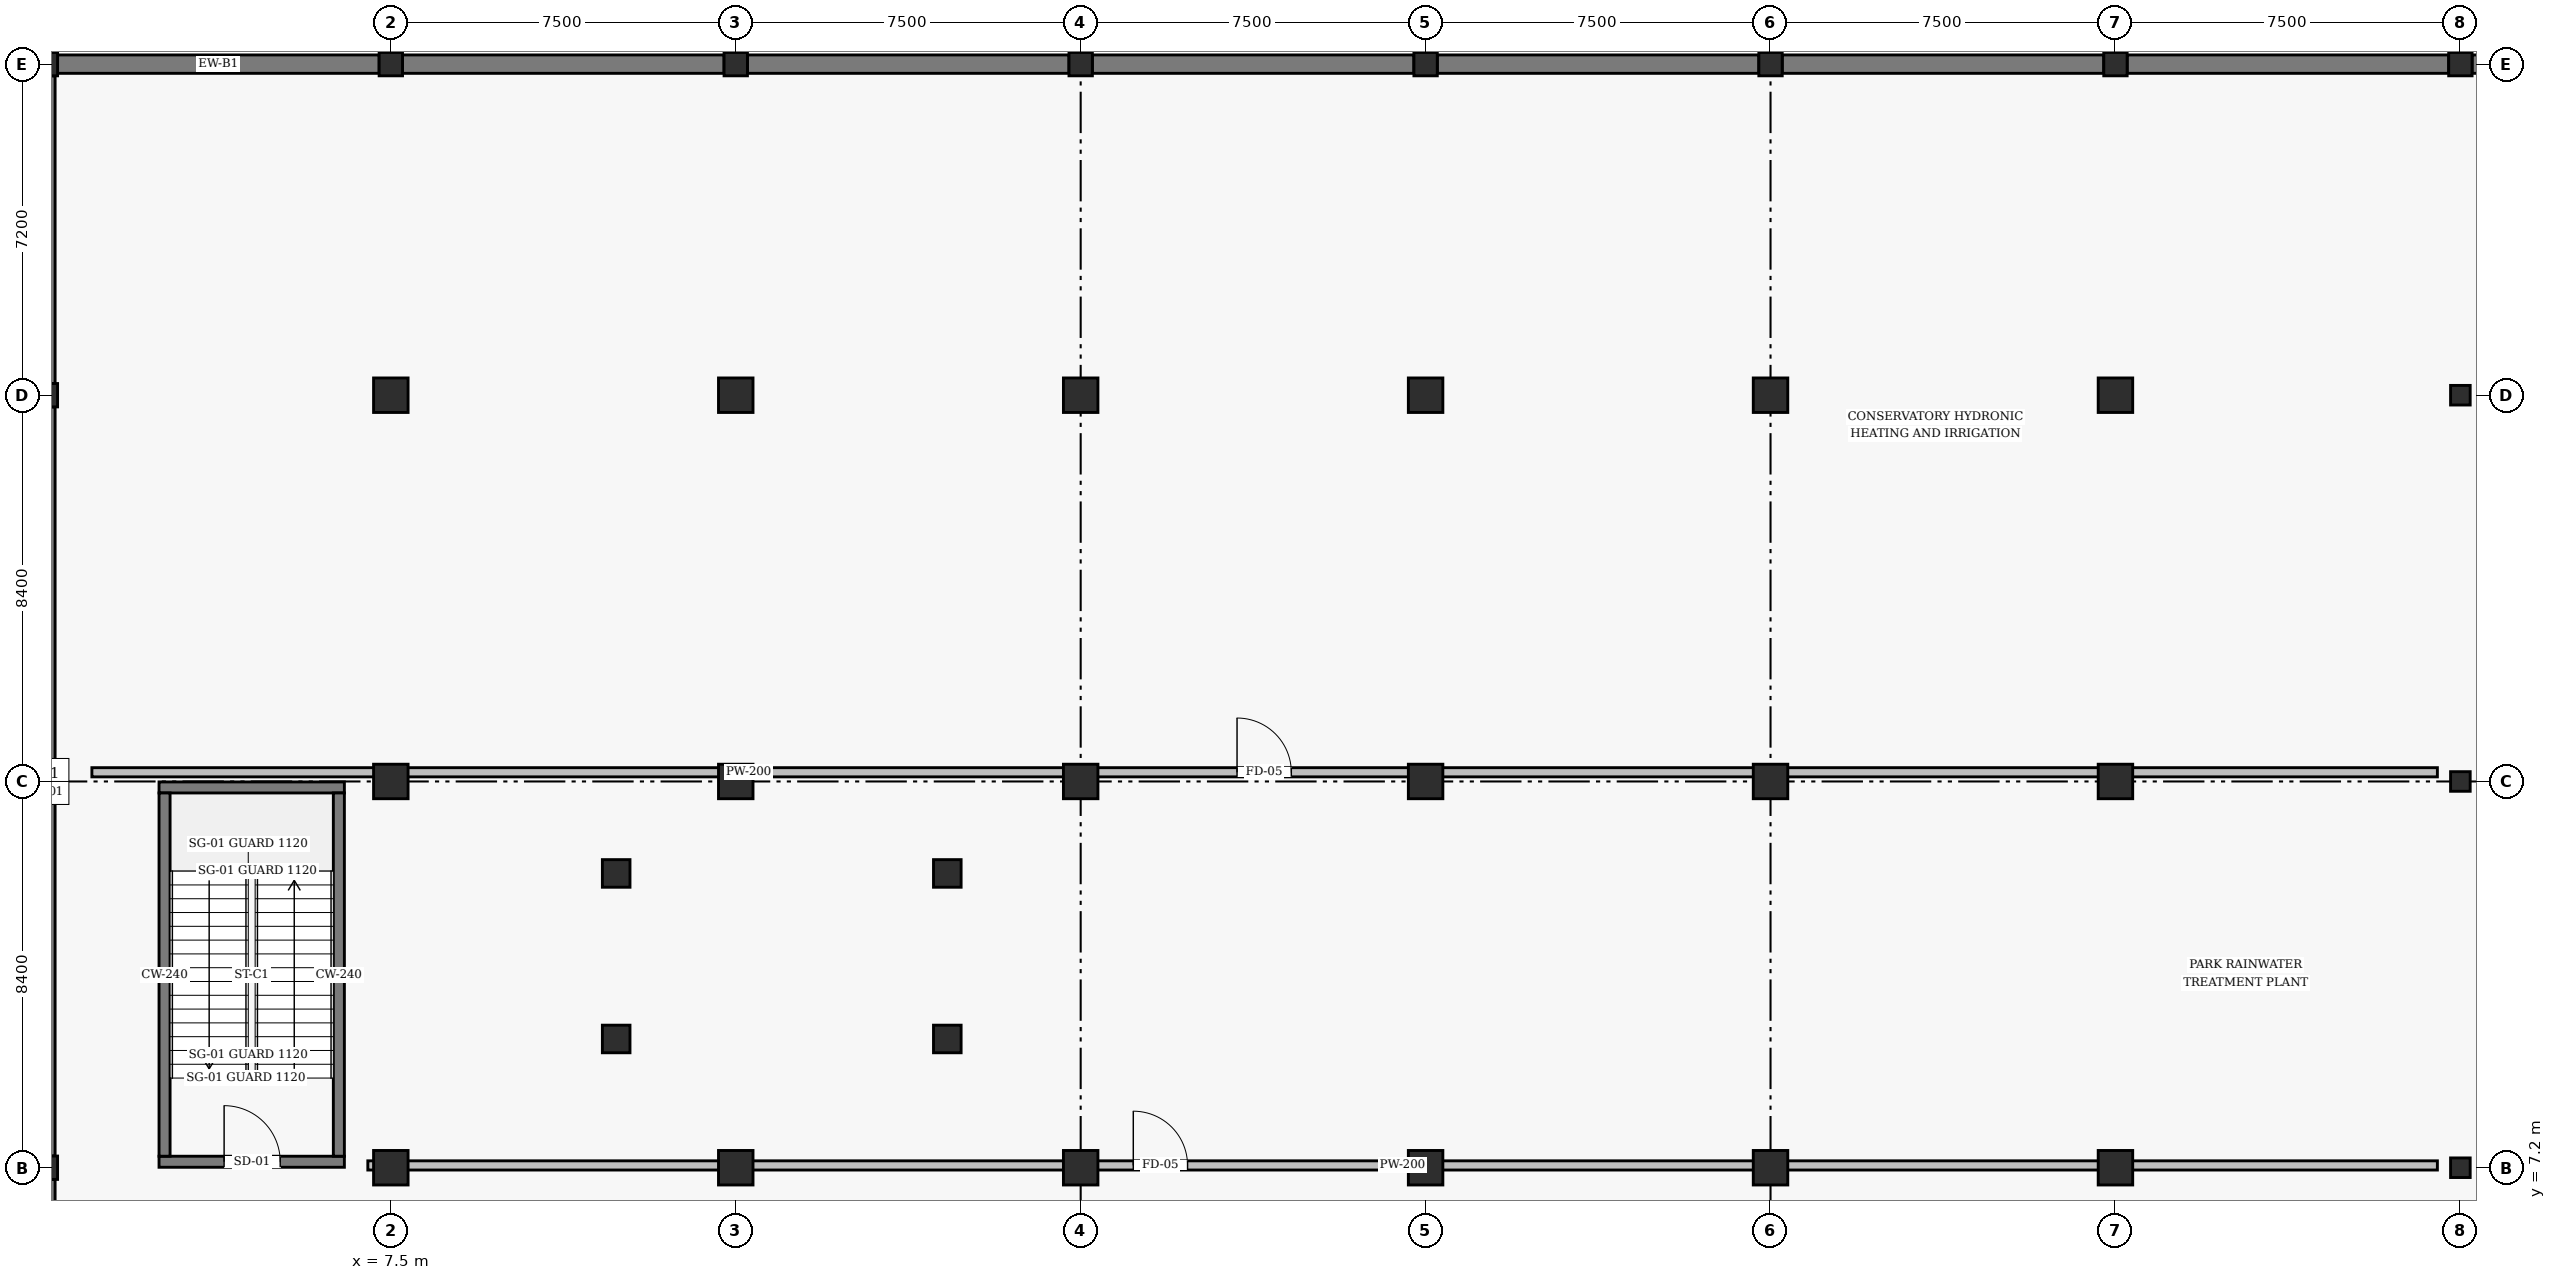
"""IFC4 building model, lengths in metres.
Left out: names, types, materials, properties, quantities, classifications, styles, units other than length and angle.
Written with IfcOpenShell. Run it as: python <this file> out.ifc"""

import sys

from ifc_helpers import new_model, si_unit, direction, frame, frame_2d, origin, origin_2d, place, context, subcontext, project, spatial, rectangle, circle, hollow_circle, extrude, element, fill, save


model = new_model("IFC4")
c1 = context("Model", 3, precision=1e-05, world=origin(), true_north=direction((0.0, 1.0)))
c2 = subcontext(c1, "Body", "Model", "MODEL_VIEW")
j1 = project(units=[si_unit("LENGTHUNIT", "METRE"), si_unit("PLANEANGLEUNIT", "RADIAN")], contexts=[c1])
p1 = place(None, origin())
s1 = spatial("IfcSite", under=j1, at=p1, CompositionType="ELEMENT")
p2 = place(p1, origin())
s2 = spatial("IfcBuilding", under=s1, at=p2, CompositionType="ELEMENT")
p3 = place(p2, frame((0.0, 0.0, -4.8)))
s3 = spatial("IfcBuildingStorey", under=s2, at=p3, CompositionType="ELEMENT", Elevation=-4.8)
for number, where, z_axis, x_axis in (
    (1, (12.4, 10.0, 0.0), (0.0, 0.0, 1.0), (1.0, 0.0, 0.0)),
    (2, (19.6, 10.0, 0.0), (0.0, 0.0, 1.0), (1.0, 0.0, 0.0)),
    (3, (19.6, 13.6, 0.0), (0.0, 0.0, 1.0), (1.0, 0.0, 0.0)),
    (4, (12.4, 13.6, 0.0), (0.0, 0.0, 1.0), (1.0, 0.0, 0.0)),
):
    element("IfcColumn", number, at=place(p3, frame(where, z_axis=z_axis, x_axis=x_axis)), inside=s3, PredefinedType="COLUMN", context=c2, shape_type="SweptSolid", body=[
        extrude(rectangle(XDim=0.6, YDim=0.6, at=origin_2d()), origin(), (0.0, 0.0, 1.0), 4.225),
    ])
for number, where, z_axis, x_axis in (
    (5, (0.0, 7.2, 0.0), (0.0, 0.0, 1.0), (1.0, 0.0, 0.0)),
    (6, (0.0, 15.6, 0.0), (0.0, 0.0, 1.0), (1.0, 0.0, 0.0)),
    (7, (0.0, 24.0, 0.0), (0.0, 0.0, 1.0), (1.0, 0.0, 0.0)),
    (8, (0.0, 31.2, 0.0), (0.0, 0.0, 1.0), (1.0, 0.0, 0.0)),
):
    element("IfcColumn", number, at=place(p3, frame(where, z_axis=z_axis, x_axis=x_axis)), inside=s3, PredefinedType="COLUMN", context=c2, shape_type="SweptSolid", body=[
        extrude(hollow_circle(Radius=0.254, WallThickness=0.016, at=origin_2d()), origin(), (0.0, 0.0, 1.0), 4.8),
    ])
for number, where, z_axis, x_axis in (
    (9, (7.5, 7.2, 0.0), (0.0, 0.0, 1.0), (1.0, 0.0, 0.0)),
    (10, (7.5, 15.6, 0.0), (0.0, 0.0, 1.0), (1.0, 0.0, 0.0)),
    (11, (7.5, 24.0, 0.0), (0.0, 0.0, 1.0), (1.0, 0.0, 0.0)),
):
    element("IfcColumn", number, at=place(p3, frame(where, z_axis=z_axis, x_axis=x_axis)), inside=s3, PredefinedType="COLUMN", context=c2, shape_type="SweptSolid", body=[
        extrude(circle(Radius=0.375, at=origin_2d()), origin(), (0.0, 0.0, 1.0), 4.8),
    ])
p4 = place(p3, frame((7.5, 31.2, 0.0), z_axis=(0.0, 0.0, 1.0), x_axis=(1.0, 0.0, 0.0)))
e12 = element("IfcColumn", 12, at=p4, inside=s3, PredefinedType="COLUMN", context=c2, shape_type="SweptSolid", body=[
    extrude(hollow_circle(Radius=0.254, WallThickness=0.016, at=origin_2d()), origin(), (0.0, 0.0, 1.0), 4.8),
])
for number, where, z_axis, x_axis in (
    (13, (15.0, 7.2, 0.0), (0.0, 0.0, 1.0), (1.0, 0.0, 0.0)),
    (14, (15.0, 15.6, 0.0), (0.0, 0.0, 1.0), (1.0, 0.0, 0.0)),
    (15, (15.0, 24.0, 0.0), (0.0, 0.0, 1.0), (1.0, 0.0, 0.0)),
):
    element("IfcColumn", number, at=place(p3, frame(where, z_axis=z_axis, x_axis=x_axis)), inside=s3, PredefinedType="COLUMN", context=c2, shape_type="SweptSolid", body=[
        extrude(circle(Radius=0.375, at=origin_2d()), origin(), (0.0, 0.0, 1.0), 4.8),
    ])
p5 = place(p3, frame((15.0, 31.2, 0.0), z_axis=(0.0, 0.0, 1.0), x_axis=(1.0, 0.0, 0.0)))
e16 = element("IfcColumn", 16, at=p5, inside=s3, PredefinedType="COLUMN", context=c2, shape_type="SweptSolid", body=[
    extrude(hollow_circle(Radius=0.254, WallThickness=0.016, at=origin_2d()), origin(), (0.0, 0.0, 1.0), 4.8),
])
for number, where, z_axis, x_axis in (
    (17, (22.5, 7.2, 0.0), (0.0, 0.0, 1.0), (1.0, 0.0, 0.0)),
    (18, (22.5, 15.6, 0.0), (0.0, 0.0, 1.0), (1.0, 0.0, 0.0)),
    (19, (22.5, 24.0, 0.0), (0.0, 0.0, 1.0), (1.0, 0.0, 0.0)),
):
    element("IfcColumn", number, at=place(p3, frame(where, z_axis=z_axis, x_axis=x_axis)), inside=s3, PredefinedType="COLUMN", context=c2, shape_type="SweptSolid", body=[
        extrude(circle(Radius=0.375, at=origin_2d()), origin(), (0.0, 0.0, 1.0), 4.8),
    ])
p6 = place(p3, frame((22.5, 31.2, 0.0), z_axis=(0.0, 0.0, 1.0), x_axis=(1.0, 0.0, 0.0)))
e20 = element("IfcColumn", 20, at=p6, inside=s3, PredefinedType="COLUMN", context=c2, shape_type="SweptSolid", body=[
    extrude(hollow_circle(Radius=0.254, WallThickness=0.016, at=origin_2d()), origin(), (0.0, 0.0, 1.0), 4.8),
])
for number, where, z_axis, x_axis in (
    (21, (30.0, 7.2, 0.0), (0.0, 0.0, 1.0), (1.0, 0.0, 0.0)),
    (22, (30.0, 15.6, 0.0), (0.0, 0.0, 1.0), (1.0, 0.0, 0.0)),
    (23, (30.0, 24.0, 0.0), (0.0, 0.0, 1.0), (1.0, 0.0, 0.0)),
):
    element("IfcColumn", number, at=place(p3, frame(where, z_axis=z_axis, x_axis=x_axis)), inside=s3, PredefinedType="COLUMN", context=c2, shape_type="SweptSolid", body=[
        extrude(circle(Radius=0.375, at=origin_2d()), origin(), (0.0, 0.0, 1.0), 4.8),
    ])
p7 = place(p3, frame((30.0, 31.2, 0.0), z_axis=(0.0, 0.0, 1.0), x_axis=(1.0, 0.0, 0.0)))
e24 = element("IfcColumn", 24, at=p7, inside=s3, PredefinedType="COLUMN", context=c2, shape_type="SweptSolid", body=[
    extrude(hollow_circle(Radius=0.254, WallThickness=0.016, at=origin_2d()), origin(), (0.0, 0.0, 1.0), 4.8),
])
for number, where, z_axis, x_axis in (
    (25, (37.5, 7.2, 0.0), (0.0, 0.0, 1.0), (1.0, 0.0, 0.0)),
    (26, (37.5, 15.6, 0.0), (0.0, 0.0, 1.0), (1.0, 0.0, 0.0)),
    (27, (37.5, 24.0, 0.0), (0.0, 0.0, 1.0), (1.0, 0.0, 0.0)),
):
    element("IfcColumn", number, at=place(p3, frame(where, z_axis=z_axis, x_axis=x_axis)), inside=s3, PredefinedType="COLUMN", context=c2, shape_type="SweptSolid", body=[
        extrude(circle(Radius=0.375, at=origin_2d()), origin(), (0.0, 0.0, 1.0), 4.8),
    ])
p8 = place(p3, frame((37.5, 31.2, 0.0), z_axis=(0.0, 0.0, 1.0), x_axis=(1.0, 0.0, 0.0)))
e28 = element("IfcColumn", 28, at=p8, inside=s3, PredefinedType="COLUMN", context=c2, shape_type="SweptSolid", body=[
    extrude(hollow_circle(Radius=0.254, WallThickness=0.016, at=origin_2d()), origin(), (0.0, 0.0, 1.0), 4.8),
])
for number, where, z_axis, x_axis in (
    (29, (45.0, 7.2, 0.0), (0.0, 0.0, 1.0), (1.0, 0.0, 0.0)),
    (30, (45.0, 15.6, 0.0), (0.0, 0.0, 1.0), (1.0, 0.0, 0.0)),
    (31, (45.0, 24.0, 0.0), (0.0, 0.0, 1.0), (1.0, 0.0, 0.0)),
):
    element("IfcColumn", number, at=place(p3, frame(where, z_axis=z_axis, x_axis=x_axis)), inside=s3, PredefinedType="COLUMN", context=c2, shape_type="SweptSolid", body=[
        extrude(circle(Radius=0.375, at=origin_2d()), origin(), (0.0, 0.0, 1.0), 4.8),
    ])
p9 = place(p3, frame((45.0, 31.2, 0.0), z_axis=(0.0, 0.0, 1.0), x_axis=(1.0, 0.0, 0.0)))
e32 = element("IfcColumn", 32, at=p9, inside=s3, PredefinedType="COLUMN", context=c2, shape_type="SweptSolid", body=[
    extrude(hollow_circle(Radius=0.254, WallThickness=0.016, at=origin_2d()), origin(), (0.0, 0.0, 1.0), 4.8),
])
for number, where, z_axis, x_axis in (
    (33, (52.5, 7.2, 0.0), (0.0, 0.0, 1.0), (1.0, 0.0, 0.0)),
    (34, (52.5, 15.6, 0.0), (0.0, 0.0, 1.0), (1.0, 0.0, 0.0)),
    (35, (52.5, 24.0, 0.0), (0.0, 0.0, 1.0), (1.0, 0.0, 0.0)),
):
    element("IfcColumn", number, at=place(p3, frame(where, z_axis=z_axis, x_axis=x_axis)), inside=s3, PredefinedType="COLUMN", context=c2, shape_type="SweptSolid", body=[
        extrude(hollow_circle(Radius=0.213, WallThickness=0.014, at=origin_2d()), origin(), (0.0, 0.0, 1.0), 4.8),
    ])
p10 = place(p3, frame((52.5, 31.2, 0.0), z_axis=(0.0, 0.0, 1.0), x_axis=(1.0, 0.0, 0.0)))
e36 = element("IfcColumn", 36, at=p10, inside=s3, PredefinedType="COLUMN", context=c2, shape_type="SweptSolid", body=[
    extrude(hollow_circle(Radius=0.254, WallThickness=0.016, at=origin_2d()), origin(), (0.0, 0.0, 1.0), 4.8),
])
p11 = place(p3, frame((59.825, 31.2, 0.0), z_axis=(0.0, 0.0, 1.0), x_axis=(-1.0, 0.0, 0.0)))
e37 = element("IfcWall", 37, at=p11, inside=s3, PredefinedType="SOLIDWALL", context=c2, shape_type="SweptSolid", body=[
    extrude(rectangle(XDim=7.071, YDim=0.4, at=frame_2d((3.536, 0.0))), origin(), (0.0, 0.0, 1.0), 3.89),
])
for number, where, z_axis, x_axis in (
    (38, (52.246, 31.2, 0.0), (0.0, 0.0, 1.0), (-1.0, 0.0, 0.0)),
    (39, (44.746, 31.2, 0.0), (0.0, 0.0, 1.0), (-1.0, 0.0, 0.0)),
    (40, (37.246, 31.2, 0.0), (0.0, 0.0, 1.0), (-1.0, 0.0, 0.0)),
    (41, (29.746, 31.2, 0.0), (0.0, 0.0, 1.0), (-1.0, 0.0, 0.0)),
    (42, (22.246, 31.2, 0.0), (0.0, 0.0, 1.0), (-1.0, 0.0, 0.0)),
    (43, (14.746, 31.2, 0.0), (0.0, 0.0, 1.0), (-1.0, 0.0, 0.0)),
    (44, (7.246, 31.2, 0.0), (0.0, 0.0, 1.0), (-1.0, 0.0, 0.0)),
):
    element("IfcWall", number, at=place(p3, frame(where, z_axis=z_axis, x_axis=x_axis)), inside=s3, PredefinedType="SOLIDWALL", context=c2, shape_type="SweptSolid", body=[
        extrude(rectangle(XDim=6.992, YDim=0.4, at=frame_2d((3.496, 0.0))), origin(), (0.0, 0.0, 1.0), 3.89),
    ])
p12 = place(p3, frame((0.0, 30.946, 0.0), z_axis=(0.0, 0.0, 1.0), x_axis=(0.0, -1.0, 0.0)))
e45 = element("IfcWall", 45, at=p12, inside=s3, PredefinedType="SOLIDWALL", context=c2, shape_type="SweptSolid", body=[
    extrude(rectangle(XDim=6.692, YDim=0.4, at=frame_2d((3.346, 0.0))), origin(), (0.0, 0.0, 1.0), 4.04),
])
p13 = place(p3, frame((0.0, 23.746, 0.0), z_axis=(0.0, 0.0, 1.0), x_axis=(0.0, -1.0, 0.0)))
e46 = element("IfcWall", 46, at=p13, inside=s3, PredefinedType="SOLIDWALL", context=c2, shape_type="SweptSolid", body=[
    extrude(rectangle(XDim=7.892, YDim=0.4, at=frame_2d((3.946, 0.0))), origin(), (0.0, 0.0, 1.0), 3.84),
])
p14 = place(p3, frame((0.0, 15.346, 0.0), z_axis=(0.0, 0.0, 1.0), x_axis=(0.0, -1.0, 0.0)))
e47 = element("IfcWall", 47, at=p14, inside=s3, PredefinedType="SOLIDWALL", context=c2, shape_type="SweptSolid", body=[
    extrude(rectangle(XDim=7.892, YDim=0.4, at=frame_2d((3.946, 0.0))), origin(), (0.0, 0.0, 1.0), 3.84),
])
p15 = place(p3, frame((0.0, 6.946, 0.0), z_axis=(0.0, 0.0, 1.0), x_axis=(0.0, -1.0, 0.0)))
e48 = element("IfcWall", 48, at=p15, inside=s3, PredefinedType="SOLIDWALL", context=c2, shape_type="SweptSolid", body=[
    extrude(rectangle(XDim=6.692, YDim=0.4, at=frame_2d((3.346, 0.0))), origin(), (0.0, 0.0, 1.0), 4.04),
])
p16 = place(p3, frame((2.46, 7.33, 0.0), z_axis=(0.0, 0.0, 1.0), x_axis=(1.0, 0.0, 0.0)))
e49 = element("IfcWall", 49, at=p16, inside=s3, PredefinedType="SHEAR", context=c2, shape_type="SweptSolid", body=[
    extrude(rectangle(XDim=4.03, YDim=0.24, at=frame_2d((2.015, 0.0))), origin(), (0.0, 0.0, 1.0), 4.54),
])
p17 = place(p16, frame((1.415, 0.0, 0.0)))
e50 = element("IfcOpeningElement", 50, at=p17, cuts=e49, PredefinedType="OPENING", context=c2, shape_type="SweptSolid", body=[
    extrude(rectangle(XDim=1.22, YDim=2.18, at=frame_2d((0.61, 1.09))), frame((0.0, 0.13, 0.0), z_axis=(0.0, -1.0, 0.0), x_axis=(1.0, 0.0, 0.0)), (0.0, 0.0, 1.0), 0.26),
])
p18 = place(p3, frame((2.46, 15.47, 0.0), z_axis=(0.0, 0.0, 1.0), x_axis=(1.0, 0.0, 0.0)))
e51 = element("IfcWall", 51, at=p18, inside=s3, PredefinedType="SHEAR", context=c2, shape_type="SweptSolid", body=[
    extrude(rectangle(XDim=4.03, YDim=0.24, at=frame_2d((2.015, 0.0))), origin(), (0.0, 0.0, 1.0), 4.54),
])
for number, where, z_axis, x_axis in (
    (52, (2.58, 7.45, 0.0), (0.0, 0.0, 1.0), (0.0, 1.0, 0.0)),
    (53, (6.37, 7.45, 0.0), (0.0, 0.0, 1.0), (0.0, 1.0, 0.0)),
):
    element("IfcWall", number, at=place(p3, frame(where, z_axis=z_axis, x_axis=x_axis)), inside=s3, PredefinedType="SHEAR", context=c2, shape_type="SweptSolid", body=[
        extrude(rectangle(XDim=7.9, YDim=0.24, at=frame_2d((3.95, 0.0))), origin(), (0.0, 0.0, 1.0), 4.54),
    ])
p19 = place(p3, frame((1.0, 15.8, 0.0), z_axis=(0.0, 0.0, 1.0), x_axis=(1.0, 0.0, 0.0)))
e54 = element("IfcWall", 54, at=p19, inside=s3, PredefinedType="SOLIDWALL", context=c2, shape_type="SweptSolid", body=[
    extrude(rectangle(XDim=51.0, YDim=0.2, at=frame_2d((25.5, 0.0))), origin(), (0.0, 0.0, 1.0), 3.84),
])
p20 = place(p19, frame((24.9, 0.0, 0.0)))
e55 = element("IfcOpeningElement", 55, at=p20, cuts=e54, PredefinedType="OPENING", context=c2, shape_type="SweptSolid", body=[
    extrude(rectangle(XDim=1.18, YDim=2.15, at=frame_2d((0.59, 1.075))), frame((0.0, 0.11, 0.0), z_axis=(0.0, -1.0, 0.0), x_axis=(1.0, 0.0, 0.0)), (0.0, 0.0, 1.0), 0.22),
])
p21 = place(p3, frame((7.0, 7.25, 0.0), z_axis=(0.0, 0.0, 1.0), x_axis=(1.0, 0.0, 0.0)))
e56 = element("IfcWall", 56, at=p21, inside=s3, PredefinedType="SOLIDWALL", context=c2, shape_type="SweptSolid", body=[
    extrude(rectangle(XDim=45.0, YDim=0.2, at=frame_2d((22.5, 0.0))), origin(), (0.0, 0.0, 1.0), 3.84),
])
p22 = place(p21, frame((16.644, 0.0, 0.0)))
e57 = element("IfcOpeningElement", 57, at=p22, cuts=e56, PredefinedType="OPENING", context=c2, shape_type="SweptSolid", body=[
    extrude(rectangle(XDim=1.18, YDim=2.15, at=frame_2d((0.59, 1.075))), frame((0.0, 0.11, 0.0), z_axis=(0.0, -1.0, 0.0), x_axis=(1.0, 0.0, 0.0)), (0.0, 0.0, 1.0), 0.22),
])
p23 = place(p17, origin())
e58 = element("IfcDoor", 58, at=p23, inside=s3, OperationType="SINGLE_SWING_LEFT", PredefinedType="DOOR", context=c2, shape_type="SweptSolid", body=[
    extrude(rectangle(XDim=1.22, YDim=2.18, at=frame_2d((0.61, 1.09))), frame((0.0, 0.025, 0.0), z_axis=(0.0, -1.0, 0.0), x_axis=(1.0, 0.0, 0.0)), (0.0, 0.0, 1.0), 0.05),
])
fill(e50, e58)
p24 = place(p20, origin())
e59 = element("IfcDoor", 59, at=p24, inside=s3, OperationType="SINGLE_SWING_LEFT", PredefinedType="DOOR", context=c2, shape_type="SweptSolid", body=[
    extrude(rectangle(XDim=1.18, YDim=2.15, at=frame_2d((0.59, 1.075))), frame((0.0, 0.025, 0.0), z_axis=(0.0, -1.0, 0.0), x_axis=(1.0, 0.0, 0.0)), (0.0, 0.0, 1.0), 0.05),
])
fill(e55, e59)
p25 = place(p22, origin())
e60 = element("IfcDoor", 60, at=p25, inside=s3, OperationType="SINGLE_SWING_LEFT", PredefinedType="DOOR", context=c2, shape_type="SweptSolid", body=[
    extrude(rectangle(XDim=1.18, YDim=2.15, at=frame_2d((0.59, 1.075))), frame((0.0, 0.025, 0.0), z_axis=(0.0, -1.0, 0.0), x_axis=(1.0, 0.0, 0.0)), (0.0, 0.0, 1.0), 0.05),
])
fill(e57, e60)
save(model, sys.argv[1])
